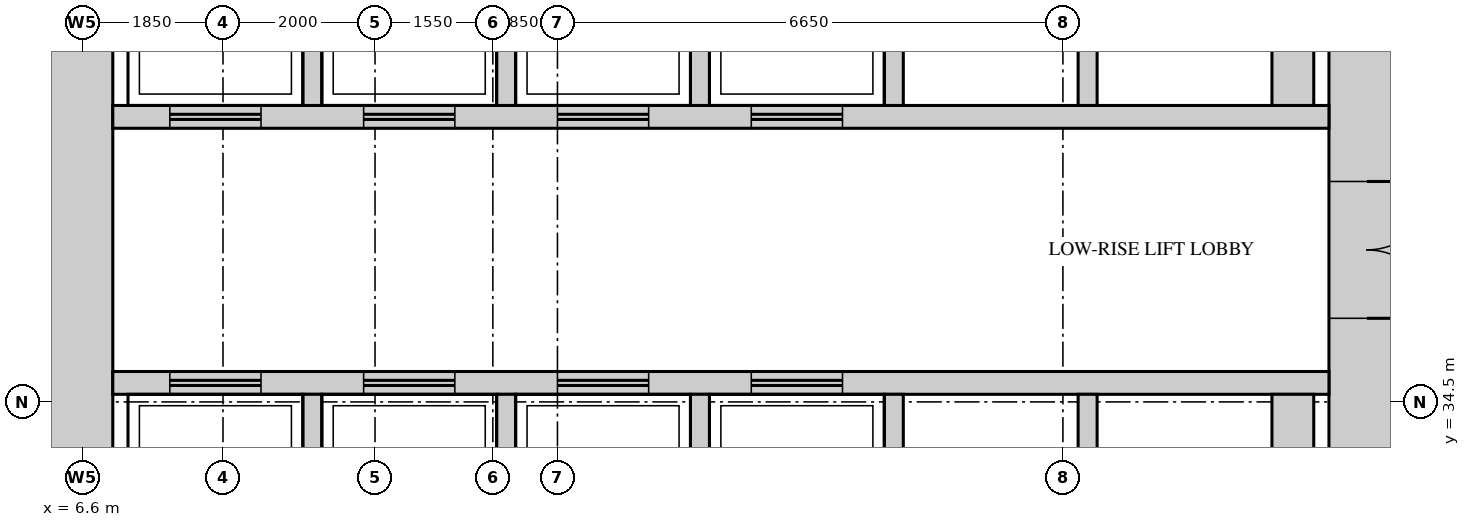
"""IFC4 building model, lengths in metres.
Left out: names, types, materials, properties, quantities, classifications, styles, units other than length and angle.
Written with IfcOpenShell. Run it as: python <this file> out.ifc"""

import sys

from ifc_helpers import new_model, si_unit, direction, frame, frame_2d, origin, place, context, subcontext, project, spatial, rectangle, extrude, source, transform, mapped, element, fill, save


model = new_model("IFC4")
c1 = context("Model", 3, precision=1e-05, world=origin(), true_north=direction((0.0, 1.0)))
c2 = subcontext(c1, "Body", "Model", "MODEL_VIEW")
j1 = project(units=[si_unit("LENGTHUNIT", "METRE"), si_unit("PLANEANGLEUNIT", "RADIAN")], contexts=[c1])
p1 = place(None, origin())
s1 = spatial("IfcSite", under=j1, at=p1, CompositionType="ELEMENT")
p2 = place(p1, origin())
s2 = spatial("IfcBuilding", under=s1, at=p2, CompositionType="ELEMENT")
p3 = place(p2, frame((0.0, 0.0, 149.9)))
s3 = spatial("IfcBuildingStorey", under=s2, at=p3, CompositionType="ELEMENT", Elevation=149.9)
m1 = source(origin(), c2, "Body", "SweptSolid", [
    extrude(rectangle(XDim=28.0, YDim=1.0, at=frame_2d((14.0, 0.0))), origin(), (0.0, 0.0, 1.0), 4.1),
])
p4 = place(p3, frame((23.5, 13.0, 0.0), z_axis=(0.0, 0.0, 1.0), x_axis=(0.0, 1.0, 0.0)))
e1 = element("IfcWall", 1, at=p4, inside=s3, PredefinedType="SHEAR", context=c2, shape_type="MappedRepresentation", body=[
    mapped(m1, transform((0.0, 0.0, 0.0))),
])
m2 = source(origin(), c2, "Body", "SweptSolid", [
    extrude(rectangle(XDim=1.8, YDim=2.1, at=frame_2d((0.9, 1.05))), frame((0.0, 0.51, 0.0), z_axis=(0.0, -1.0, 0.0), x_axis=(1.0, 0.0, 0.0)), (0.0, 0.0, 1.0), 1.02),
])
p5 = place(p4, frame((22.6, 0.0, 0.0)))
e2 = element("IfcOpeningElement", 2, at=p5, cuts=e1, PredefinedType="OPENING", context=c2, shape_type="MappedRepresentation", body=[
    mapped(m2, transform((0.0, 0.0, 0.0))),
])
m3 = source(origin(), c2, "Body", "SweptSolid", [
    extrude(rectangle(XDim=1.2, YDim=2.1, at=frame_2d((0.6, 1.05))), frame((0.0, 0.51, 0.0), z_axis=(0.0, -1.0, 0.0), x_axis=(1.0, 0.0, 0.0)), (0.0, 0.0, 1.0), 1.02),
])
p6 = place(p4, frame((14.6, 0.0, 0.0)))
e3 = element("IfcOpeningElement", 3, at=p6, cuts=e1, PredefinedType="OPENING", context=c2, shape_type="MappedRepresentation", body=[
    mapped(m3, transform((0.0, 0.0, 0.0))),
])
m4 = source(origin(), c2, "Body", "SweptSolid", [
    extrude(rectangle(XDim=0.9, YDim=2.1, at=frame_2d((0.45, 1.05))), frame((0.0, 0.51, 0.0), z_axis=(0.0, -1.0, 0.0), x_axis=(1.0, 0.0, 0.0)), (0.0, 0.0, 1.0), 1.02),
])
p7 = place(p4, frame((1.35, 0.0, 0.0)))
e4 = element("IfcOpeningElement", 4, at=p7, cuts=e1, PredefinedType="OPENING", context=c2, shape_type="MappedRepresentation", body=[
    mapped(m4, transform((0.0, 0.0, 0.0))),
])
p8 = place(p4, frame((6.2, 0.0, 0.0)))
e5 = element("IfcOpeningElement", 5, at=p8, cuts=e1, PredefinedType="OPENING", context=c2, shape_type="MappedRepresentation", body=[
    mapped(m4, transform((0.0, 0.0, 0.0))),
])
p9 = place(p3, frame((6.5, 13.0, 0.0), z_axis=(0.0, 0.0, 1.0), x_axis=(0.0, 1.0, 0.0)))
e6 = element("IfcWall", 6, at=p9, inside=s3, PredefinedType="SHEAR", context=c2, shape_type="MappedRepresentation", body=[
    mapped(m1, transform((0.0, 0.0, 0.0))),
])
m5 = source(origin(), c2, "Body", "SweptSolid", [
    extrude(rectangle(XDim=16.0, YDim=0.3, at=frame_2d((8.0, 0.0))), origin(), (0.0, 0.0, 1.0), 4.1),
])
p10 = place(p3, frame((7.0, 38.25, 0.0), z_axis=(0.0, 0.0, 1.0), x_axis=(1.0, 0.0, 0.0)))
e7 = element("IfcWall", 7, at=p10, inside=s3, PredefinedType="STANDARD", context=c2, shape_type="MappedRepresentation", body=[
    mapped(m5, transform((0.0, 0.0, 0.0))),
])
m6 = source(origin(), c2, "Body", "SweptSolid", [
    extrude(rectangle(XDim=1.2, YDim=2.1, at=frame_2d((0.6, 1.05))), frame((0.0, 0.16, 0.0), z_axis=(0.0, -1.0, 0.0), x_axis=(1.0, 0.0, 0.0)), (0.0, 0.0, 1.0), 0.32),
])
p11 = place(p10, frame((0.75, 0.0, 0.0)))
e8 = element("IfcOpeningElement", 8, at=p11, cuts=e7, PredefinedType="OPENING", context=c2, shape_type="MappedRepresentation", body=[
    mapped(m6, transform((0.0, 0.0, 0.0))),
])
p12 = place(p10, frame((3.3, 0.0, 0.0)))
e9 = element("IfcOpeningElement", 9, at=p12, cuts=e7, PredefinedType="OPENING", context=c2, shape_type="MappedRepresentation", body=[
    mapped(m6, transform((0.0, 0.0, 0.0))),
])
p13 = place(p10, frame((5.85, 0.0, 0.0)))
e10 = element("IfcOpeningElement", 10, at=p13, cuts=e7, PredefinedType="OPENING", context=c2, shape_type="MappedRepresentation", body=[
    mapped(m6, transform((0.0, 0.0, 0.0))),
])
p14 = place(p10, frame((8.4, 0.0, 0.0)))
e11 = element("IfcOpeningElement", 11, at=p14, cuts=e7, PredefinedType="OPENING", context=c2, shape_type="MappedRepresentation", body=[
    mapped(m6, transform((0.0, 0.0, 0.0))),
])
p15 = place(p3, frame((7.0, 34.75, 0.0), z_axis=(0.0, 0.0, 1.0), x_axis=(1.0, 0.0, 0.0)))
e12 = element("IfcWall", 12, at=p15, inside=s3, PredefinedType="STANDARD", context=c2, shape_type="MappedRepresentation", body=[
    mapped(m5, transform((0.0, 0.0, 0.0))),
])
p16 = place(p15, frame((0.75, 0.0, 0.0)))
e13 = element("IfcOpeningElement", 13, at=p16, cuts=e12, PredefinedType="OPENING", context=c2, shape_type="MappedRepresentation", body=[
    mapped(m6, transform((0.0, 0.0, 0.0))),
])
p17 = place(p15, frame((3.3, 0.0, 0.0)))
e14 = element("IfcOpeningElement", 14, at=p17, cuts=e12, PredefinedType="OPENING", context=c2, shape_type="MappedRepresentation", body=[
    mapped(m6, transform((0.0, 0.0, 0.0))),
])
p18 = place(p15, frame((5.85, 0.0, 0.0)))
e15 = element("IfcOpeningElement", 15, at=p18, cuts=e12, PredefinedType="OPENING", context=c2, shape_type="MappedRepresentation", body=[
    mapped(m6, transform((0.0, 0.0, 0.0))),
])
p19 = place(p15, frame((8.4, 0.0, 0.0)))
e16 = element("IfcOpeningElement", 16, at=p19, cuts=e12, PredefinedType="OPENING", context=c2, shape_type="MappedRepresentation", body=[
    mapped(m6, transform((0.0, 0.0, 0.0))),
])
m7 = source(origin(), c2, "Body", "SweptSolid", [
    extrude(rectangle(XDim=2.6, YDim=0.25, at=frame_2d((1.3, 0.0))), origin(), (0.0, 0.0, 1.0), 4.1),
])
for number, where, z_axis, x_axis in (
    (17, (9.625, 38.4, 0.0), (0.0, 0.0, 1.0), (0.0, 1.0, 0.0)),
    (18, (12.175, 38.4, 0.0), (0.0, 0.0, 1.0), (0.0, 1.0, 0.0)),
    (19, (14.725, 38.4, 0.0), (0.0, 0.0, 1.0), (0.0, 1.0, 0.0)),
    (20, (17.275, 38.4, 0.0), (0.0, 0.0, 1.0), (0.0, 1.0, 0.0)),
    (21, (19.825, 38.4, 0.0), (0.0, 0.0, 1.0), (0.0, 1.0, 0.0)),
):
    element("IfcWall", number, at=place(p3, frame(where, z_axis=z_axis, x_axis=x_axis)), inside=s3, PredefinedType="STANDARD", context=c2, shape_type="MappedRepresentation", body=[
        mapped(m7, transform((0.0, 0.0, 0.0))),
    ])
m8 = source(origin(), c2, "Body", "SweptSolid", [
    extrude(rectangle(XDim=2.6, YDim=0.55, at=frame_2d((1.3, 0.0))), origin(), (0.0, 0.0, 1.0), 4.1),
])
p20 = place(p3, frame((22.525, 38.4, 0.0), z_axis=(0.0, 0.0, 1.0), x_axis=(0.0, 1.0, 0.0)))
e22 = element("IfcWall", 22, at=p20, inside=s3, PredefinedType="STANDARD", context=c2, shape_type="MappedRepresentation", body=[
    mapped(m8, transform((0.0, 0.0, 0.0))),
])
m9 = source(origin(), c2, "Body", "SweptSolid", [
    extrude(rectangle(XDim=2.4, YDim=0.25, at=frame_2d((1.2, 0.0))), origin(), (0.0, 0.0, 1.0), 4.1),
])
for number, where, z_axis, x_axis in (
    (23, (9.625, 32.2, 0.0), (0.0, 0.0, 1.0), (0.0, 1.0, 0.0)),
    (24, (12.175, 32.2, 0.0), (0.0, 0.0, 1.0), (0.0, 1.0, 0.0)),
    (25, (14.725, 32.2, 0.0), (0.0, 0.0, 1.0), (0.0, 1.0, 0.0)),
    (26, (17.275, 32.2, 0.0), (0.0, 0.0, 1.0), (0.0, 1.0, 0.0)),
    (27, (19.825, 32.2, 0.0), (0.0, 0.0, 1.0), (0.0, 1.0, 0.0)),
):
    element("IfcWall", number, at=place(p3, frame(where, z_axis=z_axis, x_axis=x_axis)), inside=s3, PredefinedType="STANDARD", context=c2, shape_type="MappedRepresentation", body=[
        mapped(m9, transform((0.0, 0.0, 0.0))),
    ])
m10 = source(origin(), c2, "Body", "SweptSolid", [
    extrude(rectangle(XDim=2.4, YDim=0.55, at=frame_2d((1.2, 0.0))), origin(), (0.0, 0.0, 1.0), 4.1),
])
p21 = place(p3, frame((22.525, 32.2, 0.0), z_axis=(0.0, 0.0, 1.0), x_axis=(0.0, 1.0, 0.0)))
e28 = element("IfcWall", 28, at=p21, inside=s3, PredefinedType="STANDARD", context=c2, shape_type="MappedRepresentation", body=[
    mapped(m10, transform((0.0, 0.0, 0.0))),
])
m11 = source(origin(), c2, "Body", "SweptSolid", [
    extrude(rectangle(XDim=1.8, YDim=2.1, at=frame_2d((0.9, 1.05))), frame((0.0, 0.45, 0.0), z_axis=(0.0, -1.0, 0.0), x_axis=(1.0, 0.0, 0.0)), (0.0, 0.0, 1.0), 0.9),
])
p22 = place(p5, origin())
e29 = element("IfcDoor", 29, at=p22, inside=s3, OperationType="DOUBLE_DOOR_SINGLE_SWING", PredefinedType="DOOR", context=c2, shape_type="MappedRepresentation", body=[
    mapped(m11, transform((0.0, 0.0, 0.0))),
])
fill(e2, e29)
m12 = source(origin(), c2, "Body", "SweptSolid", [
    extrude(rectangle(XDim=1.2, YDim=2.1, at=frame_2d((0.6, 1.05))), frame((0.0, 0.025, 0.0), z_axis=(0.0, -1.0, 0.0), x_axis=(1.0, 0.0, 0.0)), (0.0, 0.0, 1.0), 0.05),
])
p23 = place(p16, origin())
e30 = element("IfcDoor", 30, at=p23, inside=s3, OperationType="DOUBLE_DOOR_SLIDING", PredefinedType="DOOR", context=c2, shape_type="MappedRepresentation", body=[
    mapped(m12, transform((0.0, 0.0, 0.0))),
])
fill(e13, e30)
p24 = place(p17, origin())
e31 = element("IfcDoor", 31, at=p24, inside=s3, OperationType="DOUBLE_DOOR_SLIDING", PredefinedType="DOOR", context=c2, shape_type="MappedRepresentation", body=[
    mapped(m12, transform((0.0, 0.0, 0.0))),
])
fill(e14, e31)
p25 = place(p18, origin())
e32 = element("IfcDoor", 32, at=p25, inside=s3, OperationType="DOUBLE_DOOR_SLIDING", PredefinedType="DOOR", context=c2, shape_type="MappedRepresentation", body=[
    mapped(m12, transform((0.0, 0.0, 0.0))),
])
fill(e15, e32)
p26 = place(p19, origin())
e33 = element("IfcDoor", 33, at=p26, inside=s3, OperationType="DOUBLE_DOOR_SLIDING", PredefinedType="DOOR", context=c2, shape_type="MappedRepresentation", body=[
    mapped(m12, transform((0.0, 0.0, 0.0))),
])
fill(e16, e33)
p27 = place(p11, origin())
e34 = element("IfcDoor", 34, at=p27, inside=s3, OperationType="DOUBLE_DOOR_SLIDING", PredefinedType="DOOR", context=c2, shape_type="MappedRepresentation", body=[
    mapped(m12, transform((0.0, 0.0, 0.0))),
])
fill(e8, e34)
p28 = place(p12, origin())
e35 = element("IfcDoor", 35, at=p28, inside=s3, OperationType="DOUBLE_DOOR_SLIDING", PredefinedType="DOOR", context=c2, shape_type="MappedRepresentation", body=[
    mapped(m12, transform((0.0, 0.0, 0.0))),
])
fill(e9, e35)
p29 = place(p13, origin())
e36 = element("IfcDoor", 36, at=p29, inside=s3, OperationType="DOUBLE_DOOR_SLIDING", PredefinedType="DOOR", context=c2, shape_type="MappedRepresentation", body=[
    mapped(m12, transform((0.0, 0.0, 0.0))),
])
fill(e10, e36)
p30 = place(p14, origin())
e37 = element("IfcDoor", 37, at=p30, inside=s3, OperationType="DOUBLE_DOOR_SLIDING", PredefinedType="DOOR", context=c2, shape_type="MappedRepresentation", body=[
    mapped(m12, transform((0.0, 0.0, 0.0))),
])
fill(e11, e37)
save(model, sys.argv[1])
